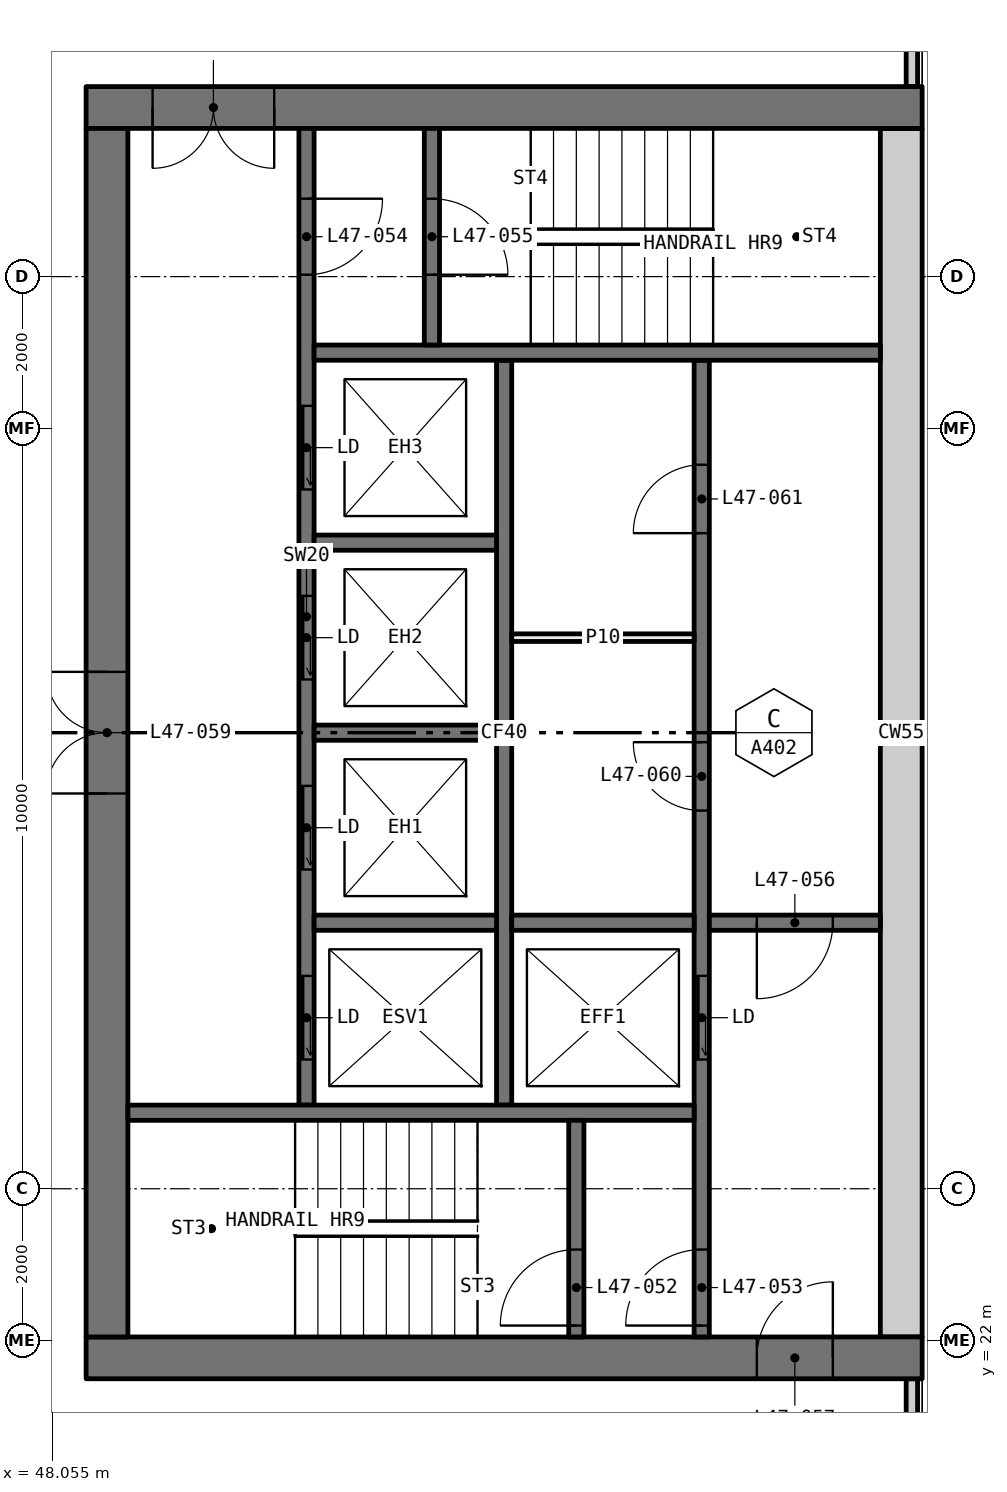
"""IFC4 building model, lengths in metres.
Left out: names, types, materials, properties, quantities, classifications, styles, units other than length and angle.
Written with IfcOpenShell. Run it as: python <this file> out.ifc"""

import sys

from ifc_helpers import new_model, si_unit, direction, frame, frame_2d, origin, place, context, subcontext, project, spatial, rectangle, extrude, element, fill, save


model = new_model("IFC4")
c1 = context("Model", 3, precision=1e-05, world=origin(), true_north=direction((0.0, 1.0)))
c2 = subcontext(c1, "Body", "Model", "MODEL_VIEW")
j1 = project(units=[si_unit("LENGTHUNIT", "METRE"), si_unit("PLANEANGLEUNIT", "RADIAN")], contexts=[c1])
p1 = place(None, origin())
s1 = spatial("IfcSite", under=j1, at=p1, CompositionType="ELEMENT")
p2 = place(p1, origin())
s2 = spatial("IfcBuilding", under=s1, at=p2, CompositionType="ELEMENT")
p3 = place(p2, frame((0.0, 0.0, 178.95)))
s3 = spatial("IfcBuildingStorey", under=s2, at=p3, CompositionType="ELEMENT", Elevation=178.95)
for number, where, z_axis, x_axis in (
    (1, (59.365, 18.71, 0.0), (0.0, 0.0, 1.0), (0.0, 1.0, 0.0)),
    (2, (59.365, 38.5, 0.0), (0.0, 0.0, 1.0), (0.0, 1.0, 0.0)),
):
    element("IfcWall", number, at=place(p3, frame(where, z_axis=z_axis, x_axis=x_axis)), inside=s3, PredefinedType="ELEMENTEDWALL", context=c2, shape_type="SweptSolid", body=[
        extrude(rectangle(XDim=2.79, YDim=0.15, at=frame_2d((1.395, 0.0))), origin(), (0.0, 0.0, 1.0), 3.05),
    ])
p4 = place(p3, frame((59.5, 21.775, 0.0), z_axis=(0.0, 0.0, 1.0), x_axis=(-1.0, 0.0, 0.0)))
e3 = element("IfcWall", 3, at=p4, inside=s3, PredefinedType="SHEAR", context=c2, shape_type="SweptSolid", body=[
    extrude(rectangle(XDim=11.0, YDim=0.55, at=frame_2d((5.5, 0.0))), origin(), (0.0, 0.0, 1.0), 3.05),
])
p5 = place(p4, frame((1.175, 0.0, 0.0)))
e4 = element("IfcOpeningElement", 4, at=p5, cuts=e3, PredefinedType="OPENING", context=c2, shape_type="SweptSolid", body=[
    extrude(rectangle(XDim=1.0, YDim=2.1, at=frame_2d((0.5, 1.05))), frame((0.0, 0.285, 0.0), z_axis=(0.0, -1.0, 0.0), x_axis=(1.0, 0.0, 0.0)), (0.0, 0.0, 1.0), 0.57),
])
p6 = place(p3, frame((59.5, 38.225, 0.0), z_axis=(0.0, 0.0, 1.0), x_axis=(-1.0, 0.0, 0.0)))
e5 = element("IfcWall", 5, at=p6, inside=s3, PredefinedType="SHEAR", context=c2, shape_type="SweptSolid", body=[
    extrude(rectangle(XDim=11.0, YDim=0.55, at=frame_2d((5.5, 0.0))), origin(), (0.0, 0.0, 1.0), 3.05),
])
p7 = place(p6, frame((8.525, 0.0, 0.0)))
e6 = element("IfcOpeningElement", 6, at=p7, cuts=e5, PredefinedType="OPENING", context=c2, shape_type="SweptSolid", body=[
    extrude(rectangle(XDim=1.6, YDim=2.1, at=frame_2d((0.8, 1.05))), frame((0.0, 0.285, 0.0), z_axis=(0.0, -1.0, 0.0), x_axis=(1.0, 0.0, 0.0)), (0.0, 0.0, 1.0), 0.57),
])
p8 = place(p3, frame((59.225, 22.05, 0.0), z_axis=(0.0, 0.0, 1.0), x_axis=(0.0, 1.0, 0.0)))
e7 = element("IfcWall", 7, at=p8, inside=s3, PredefinedType="SHEAR", context=c2, shape_type="SweptSolid", body=[
    extrude(rectangle(XDim=15.9, YDim=0.55, at=frame_2d((7.95, 0.0))), origin(), (0.0, 0.0, 1.0), 3.05),
])
p9 = place(p3, frame((48.775, 22.05, 0.0), z_axis=(0.0, 0.0, 1.0), x_axis=(0.0, 1.0, 0.0)))
e8 = element("IfcWall", 8, at=p9, inside=s3, PredefinedType="SHEAR", context=c2, shape_type="SweptSolid", body=[
    extrude(rectangle(XDim=15.9, YDim=0.55, at=frame_2d((7.95, 0.0))), origin(), (0.0, 0.0, 1.0), 3.05),
])
p10 = place(p9, frame((7.15, 0.0, 0.0)))
e9 = element("IfcOpeningElement", 9, at=p10, cuts=e8, PredefinedType="OPENING", context=c2, shape_type="SweptSolid", body=[
    extrude(rectangle(XDim=1.6, YDim=2.1, at=frame_2d((0.8, 1.05))), frame((0.0, 0.285, 0.0), z_axis=(0.0, -1.0, 0.0), x_axis=(1.0, 0.0, 0.0)), (0.0, 0.0, 1.0), 0.57),
])
p11 = place(p3, frame((56.6, 22.05, 0.0), z_axis=(0.0, 0.0, 1.0), x_axis=(0.0, 1.0, 0.0)))
e10 = element("IfcWall", 10, at=p11, inside=s3, PredefinedType="SOLIDWALL", context=c2, shape_type="SweptSolid", body=[
    extrude(rectangle(XDim=12.85, YDim=0.2, at=frame_2d((6.425, 0.0))), origin(), (0.0, 0.0, 1.0), 3.05),
])
p12 = place(p11, frame((3.65, 0.0, 0.0)))
e11 = element("IfcOpeningElement", 11, at=p12, cuts=e10, PredefinedType="OPENING", context=c2, shape_type="SweptSolid", body=[
    extrude(rectangle(XDim=1.1, YDim=2.1, at=frame_2d((0.55, 1.05))), frame((0.0, 0.11, 0.0), z_axis=(0.0, -1.0, 0.0), x_axis=(1.0, 0.0, 0.0)), (0.0, 0.0, 1.0), 0.22),
])
p13 = place(p11, frame((0.15, 0.0, 0.0)))
e12 = element("IfcOpeningElement", 12, at=p13, cuts=e10, PredefinedType="OPENING", context=c2, shape_type="SweptSolid", body=[
    extrude(rectangle(XDim=1.0, YDim=2.1, at=frame_2d((0.5, 1.05))), frame((0.0, 0.11, 0.0), z_axis=(0.0, -1.0, 0.0), x_axis=(1.0, 0.0, 0.0)), (0.0, 0.0, 1.0), 0.22),
])
p14 = place(p11, frame((6.925, 0.0, 0.0)))
e13 = element("IfcOpeningElement", 13, at=p14, cuts=e10, PredefinedType="OPENING", context=c2, shape_type="SweptSolid", body=[
    extrude(rectangle(XDim=0.9, YDim=2.1, at=frame_2d((0.45, 1.05))), frame((0.0, 0.11, 0.0), z_axis=(0.0, -1.0, 0.0), x_axis=(1.0, 0.0, 0.0)), (0.0, 0.0, 1.0), 0.22),
])
p15 = place(p11, frame((10.575, 0.0, 0.0)))
e14 = element("IfcOpeningElement", 14, at=p15, cuts=e10, PredefinedType="OPENING", context=c2, shape_type="SweptSolid", body=[
    extrude(rectangle(XDim=0.9, YDim=2.1, at=frame_2d((0.45, 1.05))), frame((0.0, 0.11, 0.0), z_axis=(0.0, -1.0, 0.0), x_axis=(1.0, 0.0, 0.0)), (0.0, 0.0, 1.0), 0.22),
])
p16 = place(p3, frame((51.4, 25.1, 0.0), z_axis=(0.0, 0.0, 1.0), x_axis=(0.0, 1.0, 0.0)))
e15 = element("IfcWall", 15, at=p16, inside=s3, PredefinedType="SOLIDWALL", context=c2, shape_type="SweptSolid", body=[
    extrude(rectangle(XDim=12.85, YDim=0.2, at=frame_2d((6.425, 0.0))), origin(), (0.0, 0.0, 1.0), 3.05),
])
p17 = place(p16, frame((0.6, 0.0, 0.0)))
e16 = element("IfcOpeningElement", 16, at=p17, cuts=e15, PredefinedType="OPENING", context=c2, shape_type="SweptSolid", body=[
    extrude(rectangle(XDim=1.1, YDim=2.1, at=frame_2d((0.55, 1.05))), frame((0.0, 0.11, 0.0), z_axis=(0.0, -1.0, 0.0), x_axis=(1.0, 0.0, 0.0)), (0.0, 0.0, 1.0), 0.22),
])
p18 = place(p16, frame((3.1, 0.0, 0.0)))
e17 = element("IfcOpeningElement", 17, at=p18, cuts=e15, PredefinedType="OPENING", context=c2, shape_type="SweptSolid", body=[
    extrude(rectangle(XDim=1.1, YDim=2.1, at=frame_2d((0.55, 1.05))), frame((0.0, 0.11, 0.0), z_axis=(0.0, -1.0, 0.0), x_axis=(1.0, 0.0, 0.0)), (0.0, 0.0, 1.0), 0.22),
])
p19 = place(p16, frame((5.6, 0.0, 0.0)))
e18 = element("IfcOpeningElement", 18, at=p19, cuts=e15, PredefinedType="OPENING", context=c2, shape_type="SweptSolid", body=[
    extrude(rectangle(XDim=1.1, YDim=2.1, at=frame_2d((0.55, 1.05))), frame((0.0, 0.11, 0.0), z_axis=(0.0, -1.0, 0.0), x_axis=(1.0, 0.0, 0.0)), (0.0, 0.0, 1.0), 0.22),
])
p20 = place(p16, frame((8.1, 0.0, 0.0)))
e19 = element("IfcOpeningElement", 19, at=p20, cuts=e15, PredefinedType="OPENING", context=c2, shape_type="SweptSolid", body=[
    extrude(rectangle(XDim=1.1, YDim=2.1, at=frame_2d((0.55, 1.05))), frame((0.0, 0.11, 0.0), z_axis=(0.0, -1.0, 0.0), x_axis=(1.0, 0.0, 0.0)), (0.0, 0.0, 1.0), 0.22),
])
p21 = place(p16, frame((10.925, 0.0, 0.0)))
e20 = element("IfcOpeningElement", 20, at=p21, cuts=e15, PredefinedType="OPENING", context=c2, shape_type="SweptSolid", body=[
    extrude(rectangle(XDim=1.0, YDim=2.1, at=frame_2d((0.5, 1.05))), frame((0.0, 0.11, 0.0), z_axis=(0.0, -1.0, 0.0), x_axis=(1.0, 0.0, 0.0)), (0.0, 0.0, 1.0), 0.22),
])
p22 = place(p3, frame((54.0, 25.1, 0.0), z_axis=(0.0, 0.0, 1.0), x_axis=(0.0, 1.0, 0.0)))
e21 = element("IfcWall", 21, at=p22, inside=s3, PredefinedType="SOLIDWALL", context=c2, shape_type="SweptSolid", body=[
    extrude(rectangle(XDim=9.8, YDim=0.2, at=frame_2d((4.9, 0.0))), origin(), (0.0, 0.0, 1.0), 3.05),
])
for number, where, z_axis, x_axis in (
    (22, (56.5, 25.0, 0.0), (0.0, 0.0, 1.0), (-1.0, 0.0, 0.0)),
    (23, (58.95, 35.0, 0.0), (0.0, 0.0, 1.0), (-1.0, 0.0, 0.0)),
):
    element("IfcWall", number, at=place(p3, frame(where, z_axis=z_axis, x_axis=x_axis)), inside=s3, PredefinedType="SOLIDWALL", context=c2, shape_type="SweptSolid", body=[
        extrude(rectangle(XDim=7.45, YDim=0.2, at=frame_2d((3.725, 0.0))), origin(), (0.0, 0.0, 1.0), 3.05),
    ])
p23 = place(p3, frame((58.95, 27.5, 0.0), z_axis=(0.0, 0.0, 1.0), x_axis=(-1.0, 0.0, 0.0)))
e24 = element("IfcWall", 24, at=p23, inside=s3, PredefinedType="SOLIDWALL", context=c2, shape_type="SweptSolid", body=[
    extrude(rectangle(XDim=2.25, YDim=0.2, at=frame_2d((1.125, 0.0))), origin(), (0.0, 0.0, 1.0), 3.05),
])
p24 = place(p23, frame((0.625, 0.0, 0.0)))
e25 = element("IfcOpeningElement", 25, at=p24, cuts=e24, PredefinedType="OPENING", context=c2, shape_type="SweptSolid", body=[
    extrude(rectangle(XDim=1.0, YDim=2.1, at=frame_2d((0.5, 1.05))), frame((0.0, 0.11, 0.0), z_axis=(0.0, -1.0, 0.0), x_axis=(1.0, 0.0, 0.0)), (0.0, 0.0, 1.0), 0.22),
])
p25 = place(p3, frame((54.95, 22.05, 0.0), z_axis=(0.0, 0.0, 1.0), x_axis=(0.0, 1.0, 0.0)))
e26 = element("IfcWall", 26, at=p25, inside=s3, PredefinedType="SOLIDWALL", context=c2, shape_type="SweptSolid", body=[
    extrude(rectangle(XDim=2.85, YDim=0.2, at=frame_2d((1.425, 0.0))), origin(), (0.0, 0.0, 1.0), 3.05),
])
p26 = place(p25, frame((0.15, 0.0, 0.0)))
e27 = element("IfcOpeningElement", 27, at=p26, cuts=e26, PredefinedType="OPENING", context=c2, shape_type="SweptSolid", body=[
    extrude(rectangle(XDim=1.0, YDim=2.1, at=frame_2d((0.5, 1.05))), frame((0.0, 0.11, 0.0), z_axis=(0.0, -1.0, 0.0), x_axis=(1.0, 0.0, 0.0)), (0.0, 0.0, 1.0), 0.22),
])
p27 = place(p3, frame((53.05, 35.1, 0.0), z_axis=(0.0, 0.0, 1.0), x_axis=(0.0, 1.0, 0.0)))
e28 = element("IfcWall", 28, at=p27, inside=s3, PredefinedType="SOLIDWALL", context=c2, shape_type="SweptSolid", body=[
    extrude(rectangle(XDim=2.85, YDim=0.2, at=frame_2d((1.425, 0.0))), origin(), (0.0, 0.0, 1.0), 3.05),
])
p28 = place(p27, frame((0.925, 0.0, 0.0)))
e29 = element("IfcOpeningElement", 29, at=p28, cuts=e28, PredefinedType="OPENING", context=c2, shape_type="SweptSolid", body=[
    extrude(rectangle(XDim=1.0, YDim=2.1, at=frame_2d((0.5, 1.05))), frame((0.0, 0.11, 0.0), z_axis=(0.0, -1.0, 0.0), x_axis=(1.0, 0.0, 0.0)), (0.0, 0.0, 1.0), 0.22),
])
for number, where, z_axis, x_axis in (
    (30, (56.5, 27.5, 0.0), (0.0, 0.0, 1.0), (-1.0, 0.0, 0.0)),
    (31, (53.9, 27.5, 0.0), (0.0, 0.0, 1.0), (-1.0, 0.0, 0.0)),
    (32, (53.9, 30.0, 0.0), (0.0, 0.0, 1.0), (-1.0, 0.0, 0.0)),
    (33, (53.9, 32.5, 0.0), (0.0, 0.0, 1.0), (-1.0, 0.0, 0.0)),
):
    element("IfcWall", number, at=place(p3, frame(where, z_axis=z_axis, x_axis=x_axis)), inside=s3, PredefinedType="SOLIDWALL", context=c2, shape_type="SweptSolid", body=[
        extrude(rectangle(XDim=2.4, YDim=0.2, at=frame_2d((1.2, 0.0))), origin(), (0.0, 0.0, 1.0), 3.05),
    ])
p29 = place(p3, frame((56.5, 31.25, 0.0), z_axis=(0.0, 0.0, 1.0), x_axis=(-1.0, 0.0, 0.0)))
e34 = element("IfcWall", 34, at=p29, inside=s3, PredefinedType="PARTITIONING", context=c2, shape_type="SweptSolid", body=[
    extrude(rectangle(XDim=2.4, YDim=0.1, at=frame_2d((1.2, 0.0))), origin(), (0.0, 0.0, 1.0), 3.05),
])
p30 = place(p17, origin())
e35 = element("IfcDoor", 35, at=p30, inside=s3, OperationType="SLIDING_TO_LEFT", PredefinedType="DOOR", context=c2, shape_type="SweptSolid", body=[
    extrude(rectangle(XDim=1.1, YDim=2.1, at=frame_2d((0.55, 1.05))), frame((0.0, 0.025, 0.0), z_axis=(0.0, -1.0, 0.0), x_axis=(1.0, 0.0, 0.0)), (0.0, 0.0, 1.0), 0.05),
])
fill(e16, e35)
p31 = place(p18, origin())
e36 = element("IfcDoor", 36, at=p31, inside=s3, OperationType="SLIDING_TO_LEFT", PredefinedType="DOOR", context=c2, shape_type="SweptSolid", body=[
    extrude(rectangle(XDim=1.1, YDim=2.1, at=frame_2d((0.55, 1.05))), frame((0.0, 0.025, 0.0), z_axis=(0.0, -1.0, 0.0), x_axis=(1.0, 0.0, 0.0)), (0.0, 0.0, 1.0), 0.05),
])
fill(e17, e36)
p32 = place(p19, origin())
e37 = element("IfcDoor", 37, at=p32, inside=s3, OperationType="SLIDING_TO_LEFT", PredefinedType="DOOR", context=c2, shape_type="SweptSolid", body=[
    extrude(rectangle(XDim=1.1, YDim=2.1, at=frame_2d((0.55, 1.05))), frame((0.0, 0.025, 0.0), z_axis=(0.0, -1.0, 0.0), x_axis=(1.0, 0.0, 0.0)), (0.0, 0.0, 1.0), 0.05),
])
fill(e18, e37)
p33 = place(p20, origin())
e38 = element("IfcDoor", 38, at=p33, inside=s3, OperationType="SLIDING_TO_LEFT", PredefinedType="DOOR", context=c2, shape_type="SweptSolid", body=[
    extrude(rectangle(XDim=1.1, YDim=2.1, at=frame_2d((0.55, 1.05))), frame((0.0, 0.025, 0.0), z_axis=(0.0, -1.0, 0.0), x_axis=(1.0, 0.0, 0.0)), (0.0, 0.0, 1.0), 0.05),
])
fill(e19, e38)
p34 = place(p12, origin())
e39 = element("IfcDoor", 39, at=p34, inside=s3, OperationType="SLIDING_TO_LEFT", PredefinedType="DOOR", context=c2, shape_type="SweptSolid", body=[
    extrude(rectangle(XDim=1.1, YDim=2.1, at=frame_2d((0.55, 1.05))), frame((0.0, 0.025, 0.0), z_axis=(0.0, -1.0, 0.0), x_axis=(1.0, 0.0, 0.0)), (0.0, 0.0, 1.0), 0.05),
])
fill(e11, e39)
p35 = place(p26, origin())
e40 = element("IfcDoor", 40, at=p35, inside=s3, OperationType="SINGLE_SWING_RIGHT", PredefinedType="DOOR", context=c2, shape_type="SweptSolid", body=[
    extrude(rectangle(XDim=1.0, YDim=2.1, at=frame_2d((0.5, 1.05))), frame((0.0, 0.025, 0.0), z_axis=(0.0, -1.0, 0.0), x_axis=(1.0, 0.0, 0.0)), (0.0, 0.0, 1.0), 0.05),
])
fill(e27, e40)
p36 = place(p13, origin())
e41 = element("IfcDoor", 41, at=p36, inside=s3, OperationType="SINGLE_SWING_RIGHT", PredefinedType="DOOR", context=c2, shape_type="SweptSolid", body=[
    extrude(rectangle(XDim=1.0, YDim=2.1, at=frame_2d((0.5, 1.05))), frame((0.0, 0.025, 0.0), z_axis=(0.0, -1.0, 0.0), x_axis=(1.0, 0.0, 0.0)), (0.0, 0.0, 1.0), 0.05),
])
fill(e12, e41)
p37 = place(p21, frame((1.0, 0.0, 0.0), x_axis=(-1.0, 0.0, 0.0)))
e42 = element("IfcDoor", 42, at=p37, inside=s3, OperationType="SINGLE_SWING_RIGHT", PredefinedType="DOOR", context=c2, shape_type="SweptSolid", body=[
    extrude(rectangle(XDim=1.0, YDim=2.1, at=frame_2d((0.5, 1.05))), frame((0.0, 0.025, 0.0), z_axis=(0.0, -1.0, 0.0), x_axis=(1.0, 0.0, 0.0)), (0.0, 0.0, 1.0), 0.05),
])
fill(e20, e42)
p38 = place(p28, frame((1.0, 0.0, 0.0), x_axis=(-1.0, 0.0, 0.0)))
e43 = element("IfcDoor", 43, at=p38, inside=s3, OperationType="SINGLE_SWING_LEFT", PredefinedType="DOOR", context=c2, shape_type="SweptSolid", body=[
    extrude(rectangle(XDim=1.0, YDim=2.1, at=frame_2d((0.5, 1.05))), frame((0.0, 0.025, 0.0), z_axis=(0.0, -1.0, 0.0), x_axis=(1.0, 0.0, 0.0)), (0.0, 0.0, 1.0), 0.05),
])
fill(e29, e43)
p39 = place(p24, origin())
e44 = element("IfcDoor", 44, at=p39, inside=s3, OperationType="SINGLE_SWING_LEFT", PredefinedType="DOOR", context=c2, shape_type="SweptSolid", body=[
    extrude(rectangle(XDim=1.0, YDim=2.1, at=frame_2d((0.5, 1.05))), frame((0.0, 0.025, 0.0), z_axis=(0.0, -1.0, 0.0), x_axis=(1.0, 0.0, 0.0)), (0.0, 0.0, 1.0), 0.05),
])
fill(e25, e44)
p40 = place(p5, frame((1.0, 0.0, 0.0), x_axis=(-1.0, 0.0, 0.0)))
e45 = element("IfcDoor", 45, at=p40, inside=s3, OperationType="SINGLE_SWING_LEFT", PredefinedType="DOOR", context=c2, shape_type="SweptSolid", body=[
    extrude(rectangle(XDim=1.0, YDim=2.1, at=frame_2d((0.5, 1.05))), frame((0.0, 0.025, 0.0), z_axis=(0.0, -1.0, 0.0), x_axis=(1.0, 0.0, 0.0)), (0.0, 0.0, 1.0), 0.05),
])
fill(e4, e45)
p41 = place(p7, origin())
e46 = element("IfcDoor", 46, at=p41, inside=s3, OperationType="DOUBLE_DOOR_SINGLE_SWING", PredefinedType="DOOR", context=c2, shape_type="SweptSolid", body=[
    extrude(rectangle(XDim=1.6, YDim=2.1, at=frame_2d((0.8, 1.05))), frame((0.0, 0.025, 0.0), z_axis=(0.0, -1.0, 0.0), x_axis=(1.0, 0.0, 0.0)), (0.0, 0.0, 1.0), 0.05),
])
fill(e6, e46)
p42 = place(p10, origin())
e47 = element("IfcDoor", 47, at=p42, inside=s3, OperationType="DOUBLE_DOOR_SINGLE_SWING", PredefinedType="DOOR", context=c2, shape_type="SweptSolid", body=[
    extrude(rectangle(XDim=1.6, YDim=2.1, at=frame_2d((0.8, 1.05))), frame((0.0, 0.025, 0.0), z_axis=(0.0, -1.0, 0.0), x_axis=(1.0, 0.0, 0.0)), (0.0, 0.0, 1.0), 0.05),
])
fill(e9, e47)
p43 = place(p14, origin())
e48 = element("IfcDoor", 48, at=p43, inside=s3, OperationType="SINGLE_SWING_LEFT", PredefinedType="DOOR", context=c2, shape_type="SweptSolid", body=[
    extrude(rectangle(XDim=0.9, YDim=2.1, at=frame_2d((0.45, 1.05))), frame((0.0, 0.025, 0.0), z_axis=(0.0, -1.0, 0.0), x_axis=(1.0, 0.0, 0.0)), (0.0, 0.0, 1.0), 0.05),
])
fill(e13, e48)
p44 = place(p15, origin())
e49 = element("IfcDoor", 49, at=p44, inside=s3, OperationType="SINGLE_SWING_RIGHT", PredefinedType="DOOR", context=c2, shape_type="SweptSolid", body=[
    extrude(rectangle(XDim=0.9, YDim=2.1, at=frame_2d((0.45, 1.05))), frame((0.0, 0.025, 0.0), z_axis=(0.0, -1.0, 0.0), x_axis=(1.0, 0.0, 0.0)), (0.0, 0.0, 1.0), 0.05),
])
fill(e14, e49)
save(model, sys.argv[1])
